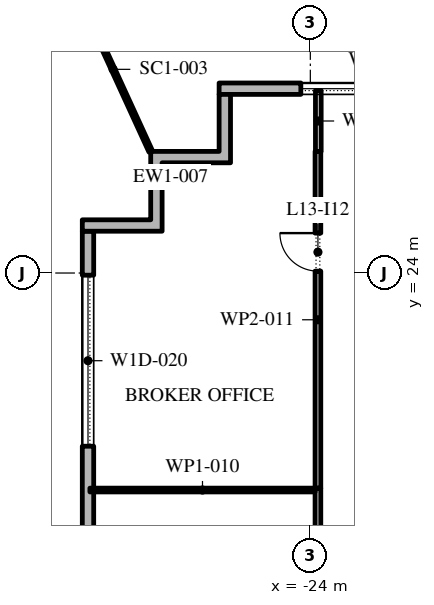
"""IFC4 building model, lengths in metres.
Left out: names, types, materials, properties, quantities, classifications, styles, units other than length and angle.
Written with IfcOpenShell. Run it as: python <this file> out.ifc"""

import sys

from ifc_helpers import new_model, si_unit, direction, frame, frame_2d, origin, place, context, subcontext, project, spatial, polyline, rectangle, outline, extrude, element, fill, save


model = new_model("IFC4")
c1 = context("Model", 3, precision=1e-05, world=origin(), true_north=direction((0.0, 1.0)))
c2 = subcontext(c1, "Body", "Model", "MODEL_VIEW")
j1 = project(units=[si_unit("LENGTHUNIT", "METRE"), si_unit("PLANEANGLEUNIT", "RADIAN")], contexts=[c1])
p1 = place(None, origin())
s1 = spatial("IfcSite", under=j1, at=p1, CompositionType="ELEMENT")
p2 = place(p1, origin())
s2 = spatial("IfcBuilding", under=s1, at=p2, CompositionType="ELEMENT")
p3 = place(p2, frame((0.0, 0.0, 64.8)))
s3 = spatial("IfcBuildingStorey", under=s2, at=p3, CompositionType="ELEMENT", Elevation=64.8)
p4 = place(p3, frame((26.1, 28.85, 0.0), z_axis=(0.0, 0.0, 1.0), x_axis=(-1.0, 0.0, 0.0)))
e1 = element("IfcWall", 1, at=p4, inside=s3, PredefinedType="STANDARD", context=c2, shape_type="SweptSolid", body=[
    extrude(rectangle(XDim=52.5, YDim=0.3, at=frame_2d((26.25, 0.0))), origin(), (0.0, 0.0, 1.0), 4.0),
])
p5 = place(p4, frame((2.0, 0.0, 0.45)))
e2 = element("IfcOpeningElement", 2, at=p5, cuts=e1, PredefinedType="OPENING", context=c2, shape_type="SweptSolid", body=[
    extrude(rectangle(XDim=4.5, YDim=2.95, at=frame_2d((2.25, 1.475))), frame((0.0, 0.16, 0.0), z_axis=(0.0, -1.0, 0.0), x_axis=(1.0, 0.0, 0.0)), (0.0, 0.0, 1.0), 0.32),
])
p6 = place(p4, frame((10.65, 0.0, 0.45)))
e3 = element("IfcOpeningElement", 3, at=p6, cuts=e1, PredefinedType="OPENING", context=c2, shape_type="SweptSolid", body=[
    extrude(rectangle(XDim=4.5, YDim=2.95, at=frame_2d((2.25, 1.475))), frame((0.0, 0.16, 0.0), z_axis=(0.0, -1.0, 0.0), x_axis=(1.0, 0.0, 0.0)), (0.0, 0.0, 1.0), 0.32),
])
p7 = place(p4, frame((20.5, 0.0, 0.0)))
e4 = element("IfcOpeningElement", 4, at=p7, cuts=e1, PredefinedType="OPENING", context=c2, shape_type="SweptSolid", body=[
    extrude(rectangle(XDim=2.4, YDim=3.5, at=frame_2d((1.2, 1.75))), frame((0.0, 0.16, 0.0), z_axis=(0.0, -1.0, 0.0), x_axis=(1.0, 0.0, 0.0)), (0.0, 0.0, 1.0), 0.32),
])
p8 = place(p4, frame((28.25, 0.0, 0.45)))
e5 = element("IfcOpeningElement", 5, at=p8, cuts=e1, PredefinedType="OPENING", context=c2, shape_type="SweptSolid", body=[
    extrude(rectangle(XDim=4.5, YDim=2.95, at=frame_2d((2.25, 1.475))), frame((0.0, 0.16, 0.0), z_axis=(0.0, -1.0, 0.0), x_axis=(1.0, 0.0, 0.0)), (0.0, 0.0, 1.0), 0.32),
])
p9 = place(p4, frame((37.05, 0.0, 0.45)))
e6 = element("IfcOpeningElement", 6, at=p9, cuts=e1, PredefinedType="OPENING", context=c2, shape_type="SweptSolid", body=[
    extrude(rectangle(XDim=4.5, YDim=2.95, at=frame_2d((2.25, 1.475))), frame((0.0, 0.16, 0.0), z_axis=(0.0, -1.0, 0.0), x_axis=(1.0, 0.0, 0.0)), (0.0, 0.0, 1.0), 0.32),
])
p10 = place(p4, frame((45.85, 0.0, 0.45)))
e7 = element("IfcOpeningElement", 7, at=p10, cuts=e1, PredefinedType="OPENING", context=c2, shape_type="SweptSolid", body=[
    extrude(rectangle(XDim=4.5, YDim=2.95, at=frame_2d((2.25, 1.475))), frame((0.0, 0.16, 0.0), z_axis=(0.0, -1.0, 0.0), x_axis=(1.0, 0.0, 0.0)), (0.0, 0.0, 1.0), 0.32),
])
p11 = place(p3, frame((-29.85, 25.1, 0.0), z_axis=(0.0, 0.0, 1.0), x_axis=(0.0, -1.0, 0.0)))
e8 = element("IfcWall", 8, at=p11, inside=s3, PredefinedType="STANDARD", context=c2, shape_type="SweptSolid", body=[
    extrude(rectangle(XDim=49.5, YDim=0.3, at=frame_2d((24.75, 0.0))), origin(), (0.0, 0.0, 1.0), 4.0),
])
p12 = place(p11, frame((1.157, 0.0, 0.45)))
e9 = element("IfcOpeningElement", 9, at=p12, cuts=e8, PredefinedType="OPENING", context=c2, shape_type="SweptSolid", body=[
    extrude(rectangle(XDim=4.5, YDim=2.875, at=frame_2d((2.25, 1.438))), frame((0.0, 0.16, 0.0), z_axis=(0.0, -1.0, 0.0), x_axis=(1.0, 0.0, 0.0)), (0.0, 0.0, 1.0), 0.32),
])
p13 = place(p11, frame((8.121, 0.0, 0.45)))
e10 = element("IfcOpeningElement", 10, at=p13, cuts=e8, PredefinedType="OPENING", context=c2, shape_type="SweptSolid", body=[
    extrude(rectangle(XDim=4.5, YDim=3.05, at=frame_2d((2.25, 1.525))), frame((0.0, 0.16, 0.0), z_axis=(0.0, -1.0, 0.0), x_axis=(1.0, 0.0, 0.0)), (0.0, 0.0, 1.0), 0.32),
])
p14 = place(p11, frame((16.286, 0.0, 0.0)))
e11 = element("IfcOpeningElement", 11, at=p14, cuts=e8, PredefinedType="OPENING", context=c2, shape_type="SweptSolid", body=[
    extrude(rectangle(XDim=2.4, YDim=3.325, at=frame_2d((1.2, 1.663))), frame((0.0, 0.16, 0.0), z_axis=(0.0, -1.0, 0.0), x_axis=(1.0, 0.0, 0.0)), (0.0, 0.0, 1.0), 0.32),
])
p15 = place(p11, frame((22.35, 0.0, 0.45)))
e12 = element("IfcOpeningElement", 12, at=p15, cuts=e8, PredefinedType="OPENING", context=c2, shape_type="SweptSolid", body=[
    extrude(rectangle(XDim=4.5, YDim=2.875, at=frame_2d((2.25, 1.438))), frame((0.0, 0.16, 0.0), z_axis=(0.0, -1.0, 0.0), x_axis=(1.0, 0.0, 0.0)), (0.0, 0.0, 1.0), 0.32),
])
p16 = place(p11, frame((29.464, 0.0, 0.45)))
e13 = element("IfcOpeningElement", 13, at=p16, cuts=e8, PredefinedType="OPENING", context=c2, shape_type="SweptSolid", body=[
    extrude(rectangle(XDim=4.5, YDim=2.875, at=frame_2d((2.25, 1.438))), frame((0.0, 0.16, 0.0), z_axis=(0.0, -1.0, 0.0), x_axis=(1.0, 0.0, 0.0)), (0.0, 0.0, 1.0), 0.32),
])
p17 = place(p11, frame((36.579, 0.0, 0.45)))
e14 = element("IfcOpeningElement", 14, at=p17, cuts=e8, PredefinedType="OPENING", context=c2, shape_type="SweptSolid", body=[
    extrude(rectangle(XDim=4.5, YDim=2.825, at=frame_2d((2.25, 1.413))), frame((0.0, 0.16, 0.0), z_axis=(0.0, -1.0, 0.0), x_axis=(1.0, 0.0, 0.0)), (0.0, 0.0, 1.0), 0.32),
])
p18 = place(p11, frame((44.743, 0.0, 0.0)))
e15 = element("IfcOpeningElement", 15, at=p18, cuts=e8, PredefinedType="OPENING", context=c2, shape_type="SweptSolid", body=[
    extrude(rectangle(XDim=2.4, YDim=3.5, at=frame_2d((1.2, 1.75))), frame((0.0, 0.16, 0.0), z_axis=(0.0, -1.0, 0.0), x_axis=(1.0, 0.0, 0.0)), (0.0, 0.0, 1.0), 0.32),
])
p19 = place(p3, origin())
e16 = element("IfcWall", 16, at=p19, inside=s3, PredefinedType="STANDARD", context=c2, shape_type="SweptSolid", body=[
    extrude(outline(polyline([(-28.2, 25.4), (-28.2, 27.2), (-26.4, 27.2), (-26.4, 28.7), (-26.1, 28.7), (-26.1, 26.9), (-27.9, 26.9), (-27.9, 25.1), (-30.0, 25.1), (-30.0, 25.4), (-28.2, 25.4)])), origin(), (0.0, 0.0, 1.0), 4.0),
])
p20 = place(p3, frame((-28.2, 27.2, -0.05), z_axis=(0.0, 0.0, 1.0), x_axis=(-0.416654710493, 0.909064822894, 0.0)))
e17 = element("IfcWall", 17, at=p20, inside=s3, PredefinedType="STANDARD", context=c2, shape_type="SweptSolid", body=[
    extrude(rectangle(XDim=4.75, YDim=0.1, at=frame_2d((2.375, 0.0))), origin(), (0.0, 0.0, 1.0), 4.05),
])
p21 = place(p3, frame((-23.8, 4.06, 0.0), z_axis=(0.0, 0.0, 1.0), x_axis=(0.0, 1.0, 0.0)))
e18 = element("IfcWall", 18, at=p21, inside=s3, PredefinedType="PARTITIONING", context=c2, shape_type="SweptSolid", body=[
    extrude(rectangle(XDim=14.28, YDim=0.15, at=frame_2d((7.14, 0.0))), origin(), (0.0, 0.0, 1.0), 4.0),
])
p22 = place(p21, frame((5.08, 0.0, 0.0)))
e19 = element("IfcOpeningElement", 19, at=p22, cuts=e18, PredefinedType="OPENING", context=c2, shape_type="SweptSolid", body=[
    extrude(rectangle(XDim=1.0, YDim=2.1, at=frame_2d((0.5, 1.05))), frame((0.0, 0.085, 0.0), z_axis=(0.0, -1.0, 0.0), x_axis=(1.0, 0.0, 0.0)), (0.0, 0.0, 1.0), 0.17),
])
p23 = place(p3, frame((-23.875, 18.29, 0.0), z_axis=(0.0, 0.0, 1.0), x_axis=(-1.0, 0.0, 0.0)))
e20 = element("IfcWall", 20, at=p23, inside=s3, PredefinedType="PARTITIONING", context=c2, shape_type="SweptSolid", body=[
    extrude(rectangle(XDim=5.925, YDim=0.1, at=frame_2d((2.962, 0.0))), origin(), (0.0, 0.0, 1.0), 4.0),
])
p24 = place(p3, frame((-23.8, 18.34, 0.0), z_axis=(0.0, 0.0, 1.0), x_axis=(0.0, 1.0, 0.0)))
e21 = element("IfcWall", 21, at=p24, inside=s3, PredefinedType="PARTITIONING", context=c2, shape_type="SweptSolid", body=[
    extrude(rectangle(XDim=8.86, YDim=0.15, at=frame_2d((4.43, 0.0))), origin(), (0.0, 0.0, 1.0), 4.0),
])
p25 = place(p24, frame((5.71, 0.0, 0.0)))
e22 = element("IfcOpeningElement", 22, at=p25, cuts=e21, PredefinedType="OPENING", context=c2, shape_type="SweptSolid", body=[
    extrude(rectangle(XDim=1.0, YDim=2.1, at=frame_2d((0.5, 1.05))), frame((0.0, 0.085, 0.0), z_axis=(0.0, -1.0, 0.0), x_axis=(1.0, 0.0, 0.0)), (0.0, 0.0, 1.0), 0.17),
])
p26 = place(p3, frame((-23.79, 27.2, 0.0), z_axis=(0.0, 0.0, 1.0), x_axis=(0.0, 1.0, 0.0)))
e23 = element("IfcWall", 23, at=p26, inside=s3, PredefinedType="PARTITIONING", context=c2, shape_type="SweptSolid", body=[
    extrude(rectangle(XDim=1.6, YDim=0.15, at=frame_2d((0.8, 0.0))), origin(), (0.0, 0.0, 1.0), 4.0),
])
p27 = place(p10, origin())
e24 = element("IfcWindow", 24, at=p27, inside=s3, PartitioningType="DOUBLE_PANEL_VERTICAL", PredefinedType="WINDOW", context=c2, shape_type="SweptSolid", body=[
    extrude(rectangle(XDim=4.5, YDim=2.95, at=frame_2d((2.25, 1.475))), frame((0.0, 0.03, 0.0), z_axis=(0.0, -1.0, 0.0), x_axis=(1.0, 0.0, 0.0)), (0.0, 0.0, 1.0), 0.06),
])
fill(e7, e24)
p28 = place(p12, origin())
e25 = element("IfcWindow", 25, at=p28, inside=s3, PartitioningType="DOUBLE_PANEL_VERTICAL", PredefinedType="WINDOW", context=c2, shape_type="SweptSolid", body=[
    extrude(rectangle(XDim=4.5, YDim=2.875, at=frame_2d((2.25, 1.438))), frame((0.0, 0.03, 0.0), z_axis=(0.0, -1.0, 0.0), x_axis=(1.0, 0.0, 0.0)), (0.0, 0.0, 1.0), 0.06),
])
fill(e9, e25)
p29 = place(p25, origin())
e26 = element("IfcDoor", 26, at=p29, inside=s3, OperationType="SINGLE_SWING_LEFT", PredefinedType="DOOR", context=c2, shape_type="SweptSolid", body=[
    extrude(rectangle(XDim=1.0, YDim=2.1, at=frame_2d((0.5, 1.05))), frame((0.0, 0.025, 0.0), z_axis=(0.0, -1.0, 0.0), x_axis=(1.0, 0.0, 0.0)), (0.0, 0.0, 1.0), 0.05),
])
fill(e22, e26)
save(model, sys.argv[1])
